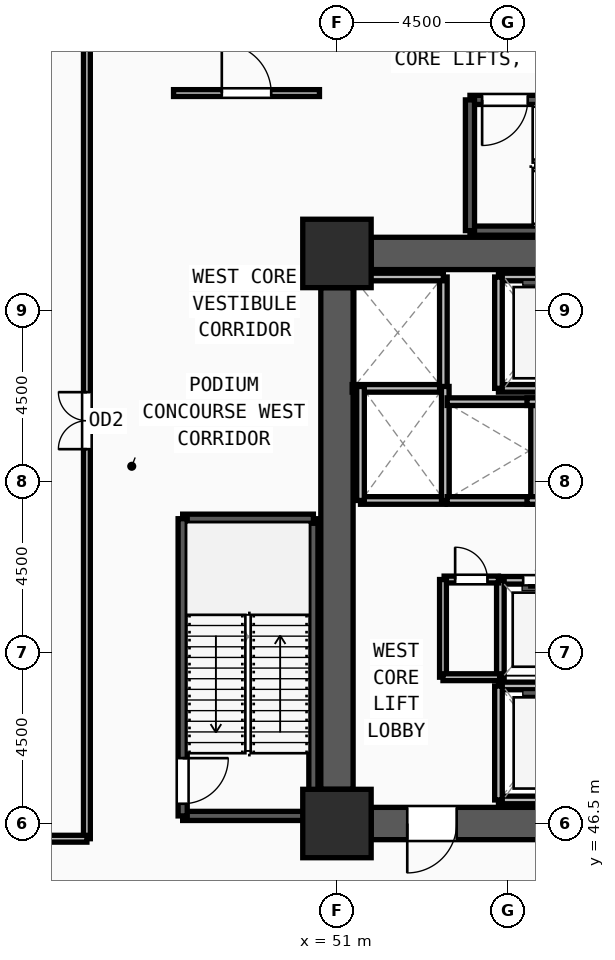
"""IFC4 building model, lengths in metres.
Left out: names, types, materials, properties, quantities, classifications, styles, units other than length and angle.
Written with IfcOpenShell. Run it as: python <this file> out.ifc"""

import sys

from ifc_helpers import new_model, si_unit, direction, frame, frame_2d, origin, origin_2d, place, context, subcontext, project, spatial, rectangle, extrude, source, transform, mapped, element, fill, save


model = new_model("IFC4")
c1 = context("Model", 3, precision=1e-05, world=origin(), true_north=direction((0.0, 1.0)))
c2 = subcontext(c1, "Body", "Model", "MODEL_VIEW")
j1 = project(units=[si_unit("LENGTHUNIT", "METRE"), si_unit("PLANEANGLEUNIT", "RADIAN")], contexts=[c1])
p1 = place(None, origin())
s1 = spatial("IfcSite", under=j1, at=p1, CompositionType="ELEMENT")
p2 = place(p1, origin())
s2 = spatial("IfcBuilding", under=s1, at=p2, CompositionType="ELEMENT")
p3 = place(p2, frame((0.0, 0.0, 18.9)))
s3 = spatial("IfcBuildingStorey", under=s2, at=p3, CompositionType="ELEMENT", Elevation=18.9)
m1 = source(origin(), c2, "Body", "SweptSolid", [
    extrude(rectangle(XDim=1.8, YDim=1.8, at=origin_2d()), origin(), (0.0, 0.0, 1.0), 4.5),
])
for number, where, z_axis, x_axis in (
    (1, (51.0, 46.5, 0.0), (0.0, 0.0, 1.0), (1.0, 0.0, 0.0)),
    (2, (51.0, 61.5, 0.0), (0.0, 0.0, 1.0), (1.0, 0.0, 0.0)),
):
    element("IfcColumn", number, at=place(p3, frame(where, z_axis=z_axis, x_axis=x_axis)), inside=s3, PredefinedType="COLUMN", context=c2, shape_type="MappedRepresentation", body=[
        mapped(m1, transform((0.0, 0.0, 0.0), x_axis=(1.0, 0.0, 0.0), y_axis=(0.0, 1.0, 0.0), z_axis=(0.0, 0.0, 1.0), scale=1.0)),
    ])
p4 = place(p3, frame((51.9, 61.5, 0.0), z_axis=(0.0, 0.0, 1.0), x_axis=(1.0, 0.0, 0.0)))
e3 = element("IfcWall", 3, at=p4, inside=s3, PredefinedType="SHEAR", context=c2, shape_type="SweptSolid", body=[
    extrude(rectangle(XDim=7.2, YDim=0.85, at=frame_2d((3.6, 0.0))), origin(), (0.0, 0.0, 1.0), 3.6),
])
p5 = place(p3, frame((59.1, 46.5, 0.0), z_axis=(0.0, 0.0, 1.0), x_axis=(-1.0, 0.0, 0.0)))
e4 = element("IfcWall", 4, at=p5, inside=s3, PredefinedType="SHEAR", context=c2, shape_type="SweptSolid", body=[
    extrude(rectangle(XDim=7.2, YDim=0.85, at=frame_2d((3.6, 0.0))), origin(), (0.0, 0.0, 1.0), 3.6),
])
m2 = source(origin(), c2, "Body", "SweptSolid", [
    extrude(rectangle(XDim=1.3, YDim=2.2, at=frame_2d((0.65, 1.1))), frame((0.0, 0.435, 0.0), z_axis=(0.0, -1.0, 0.0), x_axis=(1.0, 0.0, 0.0)), (0.0, 0.0, 1.0), 0.87),
])
p6 = place(p5, frame((4.95, 0.0, 0.0)))
e5 = element("IfcOpeningElement", 5, at=p6, cuts=e4, PredefinedType="OPENING", context=c2, shape_type="MappedRepresentation", body=[
    mapped(m2, transform((0.0, 0.0, 0.0), x_axis=(1.0, 0.0, 0.0), y_axis=(0.0, 1.0, 0.0), z_axis=(0.0, 0.0, 1.0), scale=1.0)),
])
m3 = source(origin(), c2, "Body", "SweptSolid", [
    extrude(rectangle(XDim=1.0, YDim=2.2, at=frame_2d((0.5, 1.1))), frame((0.0, 0.435, 0.0), z_axis=(0.0, -1.0, 0.0), x_axis=(1.0, 0.0, 0.0)), (0.0, 0.0, 1.0), 0.87),
])
p7 = place(p5, frame((0.45, 0.0, 0.0)))
e6 = element("IfcOpeningElement", 6, at=p7, cuts=e4, PredefinedType="OPENING", context=c2, shape_type="MappedRepresentation", body=[
    mapped(m3, transform((0.0, 0.0, 0.0), x_axis=(1.0, 0.0, 0.0), y_axis=(0.0, 1.0, 0.0), z_axis=(0.0, 0.0, 1.0), scale=1.0)),
])
p8 = place(p3, frame((51.0, 47.4, 0.0), z_axis=(0.0, 0.0, 1.0), x_axis=(0.0, 1.0, 0.0)))
e7 = element("IfcWall", 7, at=p8, inside=s3, PredefinedType="SHEAR", context=c2, shape_type="SweptSolid", body=[
    extrude(rectangle(XDim=13.2, YDim=0.85, at=frame_2d((6.6, 0.0))), origin(), (0.0, 0.0, 1.0), 3.6),
])
p9 = place(p3, frame((46.94, 46.7, 0.0), z_axis=(0.0, 0.0, 1.0), x_axis=(1.0, 0.0, 0.0)))
e8 = element("IfcWall", 8, at=p9, inside=s3, PredefinedType="SOLIDWALL", context=c2, shape_type="SweptSolid", body=[
    extrude(rectangle(XDim=3.44, YDim=0.24, at=frame_2d((1.72, 0.0))), origin(), (0.0, 0.0, 1.0), 3.6),
])
p10 = place(p3, frame((50.38, 46.7, 0.0), z_axis=(0.0, 0.0, 1.0), x_axis=(0.0, 1.0, 0.0)))
e9 = element("IfcWall", 9, at=p10, inside=s3, PredefinedType="SOLIDWALL", context=c2, shape_type="SweptSolid", body=[
    extrude(rectangle(XDim=7.82, YDim=0.24, at=frame_2d((3.91, 0.0))), origin(), (0.0, 0.0, 1.0), 3.6),
])
p11 = place(p3, frame((50.38, 54.52, 0.0), z_axis=(0.0, 0.0, 1.0), x_axis=(-1.0, 0.0, 0.0)))
e10 = element("IfcWall", 10, at=p11, inside=s3, PredefinedType="SOLIDWALL", context=c2, shape_type="SweptSolid", body=[
    extrude(rectangle(XDim=3.44, YDim=0.24, at=frame_2d((1.72, 0.0))), origin(), (0.0, 0.0, 1.0), 3.6),
])
p12 = place(p3, frame((46.94, 54.52, 0.0), z_axis=(0.0, 0.0, 1.0), x_axis=(0.0, -1.0, 0.0)))
e11 = element("IfcWall", 11, at=p12, inside=s3, PredefinedType="SOLIDWALL", context=c2, shape_type="SweptSolid", body=[
    extrude(rectangle(XDim=7.82, YDim=0.24, at=frame_2d((3.91, 0.0))), origin(), (0.0, 0.0, 1.0), 3.6),
])
m4 = source(origin(), c2, "Body", "SweptSolid", [
    extrude(rectangle(XDim=1.2, YDim=2.2, at=frame_2d((0.6, 1.1))), frame((0.0, 0.13, 0.0), z_axis=(0.0, -1.0, 0.0), x_axis=(1.0, 0.0, 0.0)), (0.0, 0.0, 1.0), 0.26),
])
p13 = place(p12, frame((6.3, 0.0, 0.0)))
e12 = element("IfcOpeningElement", 12, at=p13, cuts=e11, PredefinedType="OPENING", context=c2, shape_type="MappedRepresentation", body=[
    mapped(m4, transform((0.0, 0.0, 0.0), x_axis=(1.0, 0.0, 0.0), y_axis=(0.0, 1.0, 0.0), z_axis=(0.0, 0.0, 1.0), scale=1.0)),
])
p14 = place(p3, frame((54.5, 62.1, 0.0), z_axis=(0.0, 0.0, 1.0), x_axis=(1.0, 0.0, 0.0)))
e13 = element("IfcWall", 13, at=p14, inside=s3, PredefinedType="SOLIDWALL", context=c2, shape_type="SweptSolid", body=[
    extrude(rectangle(XDim=7.82, YDim=0.24, at=frame_2d((3.91, 0.0))), origin(), (0.0, 0.0, 1.0), 3.6),
])
p15 = place(p3, frame((62.32, 65.54, 0.0), z_axis=(0.0, 0.0, 1.0), x_axis=(-1.0, 0.0, 0.0)))
e14 = element("IfcWall", 14, at=p15, inside=s3, PredefinedType="SOLIDWALL", context=c2, shape_type="SweptSolid", body=[
    extrude(rectangle(XDim=7.82, YDim=0.24, at=frame_2d((3.91, 0.0))), origin(), (0.0, 0.0, 1.0), 3.6),
])
p16 = place(p15, frame((6.3, 0.0, 0.0)))
e15 = element("IfcOpeningElement", 15, at=p16, cuts=e14, PredefinedType="OPENING", context=c2, shape_type="MappedRepresentation", body=[
    mapped(m4, transform((0.0, 0.0, 0.0), x_axis=(1.0, 0.0, 0.0), y_axis=(0.0, 1.0, 0.0), z_axis=(0.0, 0.0, 1.0), scale=1.0)),
])
p17 = place(p3, frame((54.5, 65.54, 0.0), z_axis=(0.0, 0.0, 1.0), x_axis=(0.0, -1.0, 0.0)))
e16 = element("IfcWall", 16, at=p17, inside=s3, PredefinedType="SOLIDWALL", context=c2, shape_type="SweptSolid", body=[
    extrude(rectangle(XDim=3.44, YDim=0.24, at=frame_2d((1.72, 0.0))), origin(), (0.0, 0.0, 1.0), 3.6),
])
for number, where, z_axis, x_axis in (
    (17, (55.25, 47.12, 0.0), (0.0, 0.0, 1.0), (1.0, 0.0, 0.0)),
    (18, (57.65, 50.12, 0.0), (0.0, 0.0, 1.0), (-1.0, 0.0, 0.0)),
):
    element("IfcWall", number, at=place(p3, frame(where, z_axis=z_axis, x_axis=x_axis)), inside=s3, PredefinedType="SOLIDWALL", context=c2, shape_type="SweptSolid", body=[
        extrude(rectangle(XDim=2.4, YDim=0.2, at=frame_2d((1.2, 0.0))), origin(), (0.0, 0.0, 1.0), 3.6),
    ])
p18 = place(p3, frame((55.25, 50.12, 0.0), z_axis=(0.0, 0.0, 1.0), x_axis=(0.0, -1.0, 0.0)))
e19 = element("IfcWall", 19, at=p18, inside=s3, PredefinedType="SOLIDWALL", context=c2, shape_type="SweptSolid", body=[
    extrude(rectangle(XDim=3.0, YDim=0.2, at=frame_2d((1.5, 0.0))), origin(), (0.0, 0.0, 1.0), 3.6),
])
for number, where, z_axis, x_axis in (
    (20, (55.25, 57.95, 0.0), (0.0, 0.0, 1.0), (1.0, 0.0, 0.0)),
    (21, (57.65, 60.88, 0.0), (0.0, 0.0, 1.0), (-1.0, 0.0, 0.0)),
):
    element("IfcWall", number, at=place(p3, frame(where, z_axis=z_axis, x_axis=x_axis)), inside=s3, PredefinedType="SOLIDWALL", context=c2, shape_type="SweptSolid", body=[
        extrude(rectangle(XDim=2.4, YDim=0.2, at=frame_2d((1.2, 0.0))), origin(), (0.0, 0.0, 1.0), 3.6),
    ])
p19 = place(p3, frame((55.25, 60.88, 0.0), z_axis=(0.0, 0.0, 1.0), x_axis=(0.0, -1.0, 0.0)))
e22 = element("IfcWall", 22, at=p19, inside=s3, PredefinedType="SOLIDWALL", context=c2, shape_type="SweptSolid", body=[
    extrude(rectangle(XDim=2.93, YDim=0.2, at=frame_2d((1.465, 0.0))), origin(), (0.0, 0.0, 1.0), 3.6),
])
p20 = place(p3, frame((51.4, 57.95, 0.0), z_axis=(0.0, 0.0, 1.0), x_axis=(1.0, 0.0, 0.0)))
e23 = element("IfcWall", 23, at=p20, inside=s3, PredefinedType="SOLIDWALL", context=c2, shape_type="SweptSolid", body=[
    extrude(rectangle(XDim=2.4, YDim=0.2, at=frame_2d((1.2, 0.0))), origin(), (0.0, 0.0, 1.0), 3.6),
])
p21 = place(p3, frame((53.8, 57.95, 0.0), z_axis=(0.0, 0.0, 1.0), x_axis=(0.0, 1.0, 0.0)))
e24 = element("IfcWall", 24, at=p21, inside=s3, PredefinedType="SOLIDWALL", context=c2, shape_type="SweptSolid", body=[
    extrude(rectangle(XDim=2.93, YDim=0.2, at=frame_2d((1.465, 0.0))), origin(), (0.0, 0.0, 1.0), 3.6),
])
p22 = place(p3, frame((53.8, 60.88, 0.0), z_axis=(0.0, 0.0, 1.0), x_axis=(-1.0, 0.0, 0.0)))
e25 = element("IfcWall", 25, at=p22, inside=s3, PredefinedType="SOLIDWALL", context=c2, shape_type="SweptSolid", body=[
    extrude(rectangle(XDim=2.4, YDim=0.2, at=frame_2d((1.2, 0.0))), origin(), (0.0, 0.0, 1.0), 3.6),
])
p23 = place(p3, frame((51.62, 55.0, 0.0), z_axis=(0.0, 0.0, 1.0), x_axis=(1.0, 0.0, 0.0)))
e26 = element("IfcWall", 26, at=p23, inside=s3, PredefinedType="SOLIDWALL", context=c2, shape_type="SweptSolid", body=[
    extrude(rectangle(XDim=2.23, YDim=0.2, at=frame_2d((1.115, 0.0))), origin(), (0.0, 0.0, 1.0), 3.6),
])
for number, where, z_axis, x_axis in (
    (27, (53.85, 55.0, 0.0), (0.0, 0.0, 1.0), (0.0, 1.0, 0.0)),
    (28, (51.62, 58.0, 0.0), (0.0, 0.0, 1.0), (0.0, -1.0, 0.0)),
):
    element("IfcWall", number, at=place(p3, frame(where, z_axis=z_axis, x_axis=x_axis)), inside=s3, PredefinedType="SOLIDWALL", context=c2, shape_type="SweptSolid", body=[
        extrude(rectangle(XDim=3.0, YDim=0.2, at=frame_2d((1.5, 0.0))), origin(), (0.0, 0.0, 1.0), 3.6),
    ])
p24 = place(p3, frame((57.6, 52.9, 0.0), z_axis=(0.0, 0.0, 1.0), x_axis=(-1.0, 0.0, 0.0)))
e29 = element("IfcWall", 29, at=p24, inside=s3, PredefinedType="SOLIDWALL", context=c2, shape_type="SweptSolid", body=[
    extrude(rectangle(XDim=2.3, YDim=0.2, at=frame_2d((1.15, 0.0))), origin(), (0.0, 0.0, 1.0), 3.6),
])
m5 = source(origin(), c2, "Body", "SweptSolid", [
    extrude(rectangle(XDim=1.1, YDim=2.2, at=frame_2d((0.55, 1.1))), frame((0.0, 0.11, 0.0), z_axis=(0.0, -1.0, 0.0), x_axis=(1.0, 0.0, 0.0)), (0.0, 0.0, 1.0), 0.22),
])
p25 = place(p24, frame((0.6, 0.0, 0.0)))
e30 = element("IfcOpeningElement", 30, at=p25, cuts=e29, PredefinedType="OPENING", context=c2, shape_type="MappedRepresentation", body=[
    mapped(m5, transform((0.0, 0.0, 0.0), x_axis=(1.0, 0.0, 0.0), y_axis=(0.0, 1.0, 0.0), z_axis=(0.0, 0.0, 1.0), scale=1.0)),
])
p26 = place(p3, frame((55.3, 52.9, 0.0), z_axis=(0.0, 0.0, 1.0), x_axis=(0.0, -1.0, 0.0)))
e31 = element("IfcWall", 31, at=p26, inside=s3, PredefinedType="SOLIDWALL", context=c2, shape_type="SweptSolid", body=[
    extrude(rectangle(XDim=2.6, YDim=0.2, at=frame_2d((1.3, 0.0))), origin(), (0.0, 0.0, 1.0), 3.6),
])
p27 = place(p3, frame((53.9, 55.0, 0.0), z_axis=(0.0, 0.0, 1.0), x_axis=(1.0, 0.0, 0.0)))
e32 = element("IfcWall", 32, at=p27, inside=s3, PredefinedType="SOLIDWALL", context=c2, shape_type="SweptSolid", body=[
    extrude(rectangle(XDim=2.3, YDim=0.2, at=frame_2d((1.15, 0.0))), origin(), (0.0, 0.0, 1.0), 3.6),
])
p28 = place(p3, frame((56.2, 55.0, 0.0), z_axis=(0.0, 0.0, 1.0), x_axis=(0.0, 1.0, 0.0)))
e33 = element("IfcWall", 33, at=p28, inside=s3, PredefinedType="SOLIDWALL", context=c2, shape_type="SweptSolid", body=[
    extrude(rectangle(XDim=2.6, YDim=0.2, at=frame_2d((1.3, 0.0))), origin(), (0.0, 0.0, 1.0), 3.6),
])
p29 = place(p3, frame((56.2, 57.6, 0.0), z_axis=(0.0, 0.0, 1.0), x_axis=(-1.0, 0.0, 0.0)))
e34 = element("IfcWall", 34, at=p29, inside=s3, PredefinedType="SOLIDWALL", context=c2, shape_type="SweptSolid", body=[
    extrude(rectangle(XDim=2.3, YDim=0.2, at=frame_2d((1.15, 0.0))), origin(), (0.0, 0.0, 1.0), 3.6),
])
for number, where, z_axis, x_axis in (
    (35, (56.0, 55.0, 0.0), (0.0, 0.0, 1.0), (1.0, 0.0, 0.0)),
    (36, (58.2, 57.6, 0.0), (0.0, 0.0, 1.0), (-1.0, 0.0, 0.0)),
):
    element("IfcWall", number, at=place(p3, frame(where, z_axis=z_axis, x_axis=x_axis)), inside=s3, PredefinedType="SOLIDWALL", context=c2, shape_type="SweptSolid", body=[
        extrude(rectangle(XDim=2.2, YDim=0.2, at=frame_2d((1.1, 0.0))), origin(), (0.0, 0.0, 1.0), 3.6),
    ])
p30 = place(p3, frame((53.82, 52.92, 0.0), z_axis=(0.0, 0.0, 1.0), x_axis=(1.0, 0.0, 0.0)))
e37 = element("IfcWall", 37, at=p30, inside=s3, PredefinedType="PARTITIONING", context=c2, shape_type="SweptSolid", body=[
    extrude(rectangle(XDim=1.43, YDim=0.18, at=frame_2d((0.715, 0.0))), origin(), (0.0, 0.0, 1.0), 3.6),
])
m6 = source(origin(), c2, "Body", "SweptSolid", [
    extrude(rectangle(XDim=0.85, YDim=2.1, at=frame_2d((0.425, 1.05))), frame((0.0, 0.1, 0.0), z_axis=(0.0, -1.0, 0.0), x_axis=(1.0, 0.0, 0.0)), (0.0, 0.0, 1.0), 0.2),
])
p31 = place(p30, frame((0.29, 0.0, 0.0)))
e38 = element("IfcOpeningElement", 38, at=p31, cuts=e37, PredefinedType="OPENING", context=c2, shape_type="MappedRepresentation", body=[
    mapped(m6, transform((0.0, 0.0, 0.0), x_axis=(1.0, 0.0, 0.0), y_axis=(0.0, 1.0, 0.0), z_axis=(0.0, 0.0, 1.0), scale=1.0)),
])
p32 = place(p3, frame((46.7, 65.72, 0.0), z_axis=(0.0, 0.0, 1.0), x_axis=(1.0, 0.0, 0.0)))
e39 = element("IfcWall", 39, at=p32, inside=s3, PredefinedType="PARTITIONING", context=c2, shape_type="SweptSolid", body=[
    extrude(rectangle(XDim=3.84, YDim=0.18, at=frame_2d((1.92, 0.0))), origin(), (0.0, 0.0, 1.0), 3.6),
])
m7 = source(origin(), c2, "Body", "SweptSolid", [
    extrude(rectangle(XDim=1.3, YDim=2.2, at=frame_2d((0.65, 1.1))), frame((0.0, 0.1, 0.0), z_axis=(0.0, -1.0, 0.0), x_axis=(1.0, 0.0, 0.0)), (0.0, 0.0, 1.0), 0.2),
])
p33 = place(p32, frame((1.27, 0.0, 0.0)))
e40 = element("IfcOpeningElement", 40, at=p33, cuts=e39, PredefinedType="OPENING", context=c2, shape_type="MappedRepresentation", body=[
    mapped(m7, transform((0.0, 0.0, 0.0), x_axis=(1.0, 0.0, 0.0), y_axis=(0.0, 1.0, 0.0), z_axis=(0.0, 0.0, 1.0), scale=1.0)),
])
p34 = place(p3, frame((44.42, 46.1, 0.0), z_axis=(0.0, 0.0, 1.0), x_axis=(0.0, 1.0, 0.0)))
e41 = element("IfcWall", 41, at=p34, inside=s3, PredefinedType="PARTITIONING", context=c2, shape_type="SweptSolid", body=[
    extrude(rectangle(XDim=22.0, YDim=0.18, at=frame_2d((11.0, 0.0))), origin(), (0.0, 0.0, 1.0), 3.6),
])
m8 = source(origin(), c2, "Body", "SweptSolid", [
    extrude(rectangle(XDim=1.5, YDim=2.2, at=frame_2d((0.75, 1.1))), frame((0.0, 0.1, 0.0), z_axis=(0.0, -1.0, 0.0), x_axis=(1.0, 0.0, 0.0)), (0.0, 0.0, 1.0), 0.2),
])
p35 = place(p34, frame((10.25, 0.0, 0.0)))
e42 = element("IfcOpeningElement", 42, at=p35, cuts=e41, PredefinedType="OPENING", context=c2, shape_type="MappedRepresentation", body=[
    mapped(m8, transform((0.0, 0.0, 0.0), x_axis=(1.0, 0.0, 0.0), y_axis=(0.0, 1.0, 0.0), z_axis=(0.0, 0.0, 1.0), scale=1.0)),
])
p36 = place(p3, frame((53.79, 50.35, 0.0), z_axis=(0.0, 0.0, 1.0), x_axis=(0.0, 1.0, 0.0)))
e43 = element("IfcWall", 43, at=p36, inside=s3, PredefinedType="PARTITIONING", context=c2, shape_type="SweptSolid", body=[
    extrude(rectangle(XDim=2.57, YDim=0.18, at=frame_2d((1.285, 0.0))), origin(), (0.0, 0.0, 1.0), 3.6),
])
p37 = place(p3, frame((53.79, 50.35, 0.0), z_axis=(0.0, 0.0, 1.0), x_axis=(1.0, 0.0, 0.0)))
e44 = element("IfcWall", 44, at=p37, inside=s3, PredefinedType="PARTITIONING", context=c2, shape_type="SweptSolid", body=[
    extrude(rectangle(XDim=1.49, YDim=0.18, at=frame_2d((0.745, 0.0))), origin(), (0.0, 0.0, 1.0), 3.6),
])
p38 = place(p3, frame((23.625, 46.1, 0.0), z_axis=(0.0, 0.0, 1.0), x_axis=(1.0, 0.0, 0.0)))
e45 = element("IfcWall", 45, at=p38, inside=s3, PredefinedType="PARTITIONING", context=c2, shape_type="SweptSolid", body=[
    extrude(rectangle(XDim=20.795, YDim=0.18, at=frame_2d((10.397, 0.0))), origin(), (0.0, 0.0, 1.0), 3.6),
])
m9 = source(origin(), c2, "Body", "SweptSolid", [
    extrude(rectangle(XDim=1.3, YDim=2.2, at=frame_2d((0.65, 1.1))), frame((0.0, 0.025, 0.0), z_axis=(0.0, -1.0, 0.0), x_axis=(1.0, 0.0, 0.0)), (0.0, 0.0, 1.0), 0.05),
])
p39 = place(p6, origin())
e46 = element("IfcDoor", 46, at=p39, inside=s3, OperationType="SINGLE_SWING_RIGHT", PredefinedType="DOOR", context=c2, shape_type="MappedRepresentation", body=[
    mapped(m9, transform((0.0, 0.0, 0.0), x_axis=(1.0, 0.0, 0.0), y_axis=(0.0, 1.0, 0.0), z_axis=(0.0, 0.0, 1.0), scale=1.0)),
])
fill(e5, e46)
m10 = source(origin(), c2, "Body", "SweptSolid", [
    extrude(rectangle(XDim=1.2, YDim=2.2, at=frame_2d((0.6, 1.1))), frame((0.0, 0.025, 0.0), z_axis=(0.0, -1.0, 0.0), x_axis=(1.0, 0.0, 0.0)), (0.0, 0.0, 1.0), 0.05),
])
p40 = place(p13, origin())
e47 = element("IfcDoor", 47, at=p40, inside=s3, OperationType="SINGLE_SWING_LEFT", PredefinedType="DOOR", context=c2, shape_type="MappedRepresentation", body=[
    mapped(m10, transform((0.0, 0.0, 0.0), x_axis=(1.0, 0.0, 0.0), y_axis=(0.0, 1.0, 0.0), z_axis=(0.0, 0.0, 1.0), scale=1.0)),
])
fill(e12, e47)
p41 = place(p16, origin())
e48 = element("IfcDoor", 48, at=p41, inside=s3, OperationType="SINGLE_SWING_RIGHT", PredefinedType="DOOR", context=c2, shape_type="MappedRepresentation", body=[
    mapped(m10, transform((0.0, 0.0, 0.0), x_axis=(1.0, 0.0, 0.0), y_axis=(0.0, 1.0, 0.0), z_axis=(0.0, 0.0, 1.0), scale=1.0)),
])
fill(e15, e48)
m11 = source(origin(), c2, "Body", "SweptSolid", [
    extrude(rectangle(XDim=1.1, YDim=2.2, at=frame_2d((0.55, 1.1))), frame((0.0, 0.025, 0.0), z_axis=(0.0, -1.0, 0.0), x_axis=(1.0, 0.0, 0.0)), (0.0, 0.0, 1.0), 0.05),
])
p42 = place(p25, origin())
e49 = element("IfcDoor", 49, at=p42, inside=s3, OperationType="SLIDING_TO_LEFT", PredefinedType="DOOR", context=c2, shape_type="MappedRepresentation", body=[
    mapped(m11, transform((0.0, 0.0, 0.0), x_axis=(1.0, 0.0, 0.0), y_axis=(0.0, 1.0, 0.0), z_axis=(0.0, 0.0, 1.0), scale=1.0)),
])
fill(e30, e49)
m12 = source(origin(), c2, "Body", "SweptSolid", [
    extrude(rectangle(XDim=0.85, YDim=2.1, at=frame_2d((0.425, 1.05))), frame((0.0, 0.025, 0.0), z_axis=(0.0, -1.0, 0.0), x_axis=(1.0, 0.0, 0.0)), (0.0, 0.0, 1.0), 0.05),
])
p43 = place(p31, origin())
e50 = element("IfcDoor", 50, at=p43, inside=s3, OperationType="SINGLE_SWING_LEFT", PredefinedType="DOOR", context=c2, shape_type="MappedRepresentation", body=[
    mapped(m12, transform((0.0, 0.0, 0.0), x_axis=(1.0, 0.0, 0.0), y_axis=(0.0, 1.0, 0.0), z_axis=(0.0, 0.0, 1.0), scale=1.0)),
])
fill(e38, e50)
p44 = place(p33, origin())
e51 = element("IfcDoor", 51, at=p44, inside=s3, OperationType="SINGLE_SWING_LEFT", PredefinedType="DOOR", context=c2, shape_type="MappedRepresentation", body=[
    mapped(m9, transform((0.0, 0.0, 0.0), x_axis=(1.0, 0.0, 0.0), y_axis=(0.0, 1.0, 0.0), z_axis=(0.0, 0.0, 1.0), scale=1.0)),
])
fill(e40, e51)
m13 = source(origin(), c2, "Body", "SweptSolid", [
    extrude(rectangle(XDim=1.5, YDim=2.2, at=frame_2d((0.75, 1.1))), frame((0.0, 0.025, 0.0), z_axis=(0.0, -1.0, 0.0), x_axis=(1.0, 0.0, 0.0)), (0.0, 0.0, 1.0), 0.05),
])
p45 = place(p35, origin())
e52 = element("IfcDoor", 52, at=p45, inside=s3, OperationType="DOUBLE_DOOR_SINGLE_SWING", PredefinedType="DOOR", context=c2, shape_type="MappedRepresentation", body=[
    mapped(m13, transform((0.0, 0.0, 0.0), x_axis=(1.0, 0.0, 0.0), y_axis=(0.0, 1.0, 0.0), z_axis=(0.0, 0.0, 1.0), scale=1.0)),
])
fill(e42, e52)
save(model, sys.argv[1])
